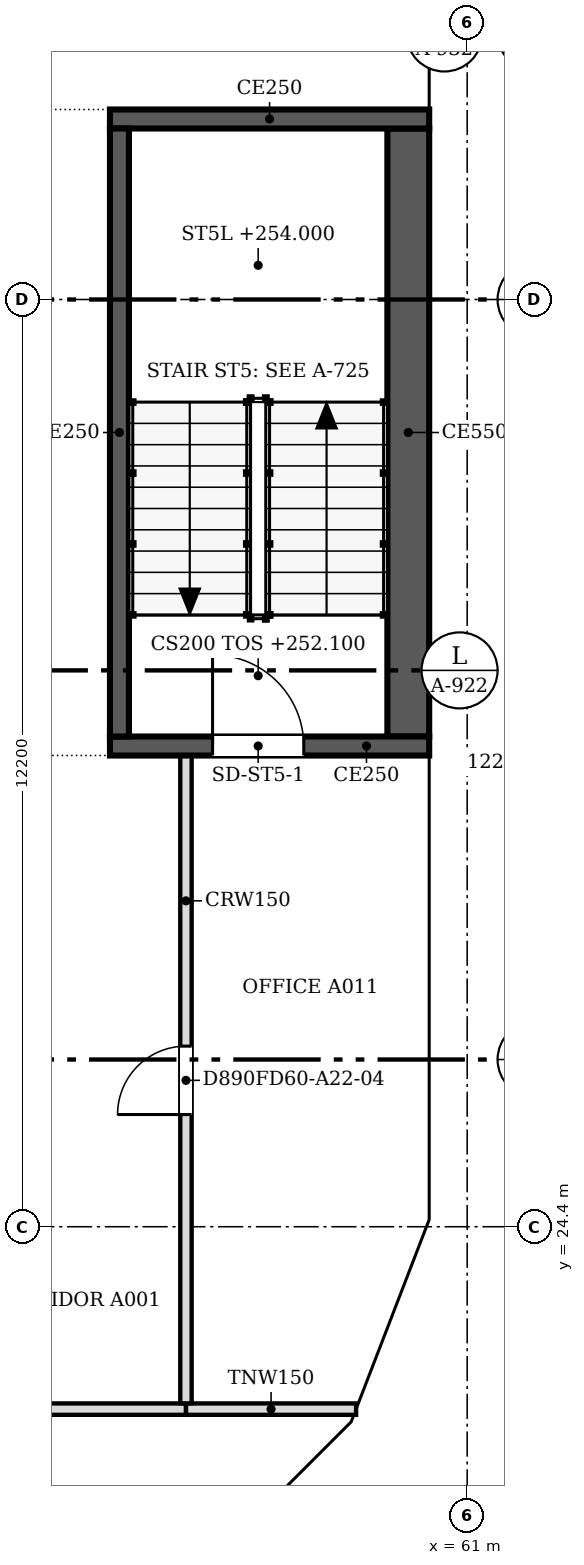
"""IFC4 building model, lengths in metres.
Left out: names, types, materials, properties, quantities, classifications, styles, units other than length and angle.
Written with IfcOpenShell. Run it as: python <this file> out.ifc"""

import sys

from ifc_helpers import new_model, si_unit, direction, frame, frame_2d, origin, place, context, subcontext, project, spatial, polyline, rectangle, outline, extrude, faceted_brep, source, transform, mapped, element, fill, save


model = new_model("IFC4")
c1 = context("Model", 3, precision=1e-05, world=origin(), true_north=direction((0.0, 1.0)))
c2 = subcontext(c1, "Body", "Model", "MODEL_VIEW")
j1 = project(units=[si_unit("LENGTHUNIT", "METRE"), si_unit("PLANEANGLEUNIT", "RADIAN")], contexts=[c1])
p1 = place(None, origin())
s1 = spatial("IfcSite", under=j1, at=p1, CompositionType="ELEMENT")
p2 = place(p1, origin())
s2 = spatial("IfcBuilding", under=s1, at=p2, CompositionType="ELEMENT")
p3 = place(p2, frame((0.0, 0.0, 252.1)))
s3 = spatial("IfcBuildingStorey", under=s2, at=p3, CompositionType="ELEMENT", Elevation=252.1)
m1 = source(origin(), c2, "Body", "Brep", [
    faceted_brep([(2.944, -0.25, 0.0), (2.997, -0.25, 0.068), (2.997, -0.25, 7.532), (2.944, -0.25, 7.6), (0.0, -0.25, 3.8), (0.053, 0.25, 3.868), (2.891, 0.25, 7.532), (2.891, 0.25, 0.068), (0.053, 0.25, 3.732), (2.944, 0.0, 0.0), (2.944, 0.0, 7.6), (0.0, 0.0, 3.8)], [[[0, 1, 2, 3, 4]], [[5, 6, 7, 8]], [[1, 0, 9]], [[10, 3, 2]], [[6, 5, 11, 4, 3, 10]], [[8, 7, 9, 0, 4, 11]], [[8, 11, 5]], [[1, 9, 7, 6, 10, 2]]]),
])
p4 = place(p3, frame((57.606, 19.612, -3.8), z_axis=(0.0, 0.0, 1.0), x_axis=(0.707106781187, 0.707106781187, 0.0)))
e1 = element("IfcWall", 1, at=p4, inside=s3, PredefinedType="SOLIDWALL", context=c2, shape_type="MappedRepresentation", body=[
    mapped(m1, transform((0.0, 0.0, 0.0), scale=1.0)),
])
m2 = source(origin(), c2, "Body", "SweptSolid", [
    extrude(outline(polyline([(2.744, 6.934), (0.316, 3.8), (2.744, 0.666), (2.744, 6.934)])), frame((0.0, 0.26, 0.0), z_axis=(0.0, -1.0, 0.0), x_axis=(1.0, 0.0, 0.0)), (0.0, 0.0, 1.0), 0.52),
])
p5 = place(p4, origin())
e2 = element("IfcOpeningElement", 2, at=p5, cuts=e1, PredefinedType="OPENING", context=c2, shape_type="MappedRepresentation", body=[
    mapped(m2, transform((0.0, 0.0, 0.0), scale=1.0)),
])
m3 = source(origin(), c2, "Body", "Brep", [
    faceted_brep([(0.053, -0.25, 0.0), (3.003, -0.25, 3.8), (0.053, -0.25, 7.6), (0.0, -0.25, 7.531), (0.0, -0.25, 0.068), (0.106, 0.25, 7.532), (2.957, 0.25, 3.86), (2.957, 0.25, 3.74), (0.106, 0.25, 0.068), (3.003, 0.0, 3.8), (0.053, 0.0, 0.0), (0.053, 0.0, 7.6)], [[[0, 1, 2, 3, 4]], [[5, 6, 7, 8]], [[8, 7, 9, 1, 0, 10]], [[6, 5, 11, 2, 1, 9]], [[3, 2, 11]], [[10, 0, 4]], [[8, 10, 4, 3, 11, 5]], [[7, 6, 9]]]),
])
p6 = place(p3, frame((59.669, 21.644, -3.8), z_axis=(0.0, 0.0, 1.0), x_axis=(0.35992665181, 0.932980602862, 0.0)))
e3 = element("IfcWall", 3, at=p6, inside=s3, PredefinedType="SOLIDWALL", context=c2, shape_type="MappedRepresentation", body=[
    mapped(m3, transform((0.0, 0.0, 0.0), scale=1.0)),
])
m4 = source(origin(), c2, "Body", "SweptSolid", [
    extrude(outline(polyline([(0.253, 0.665), (2.687, 3.8), (0.253, 6.935), (0.253, 0.665)])), frame((0.0, 0.26, 0.0), z_axis=(0.0, -1.0, 0.0), x_axis=(1.0, 0.0, 0.0)), (0.0, 0.0, 1.0), 0.52),
])
p7 = place(p6, origin())
e4 = element("IfcOpeningElement", 4, at=p7, cuts=e3, PredefinedType="OPENING", context=c2, shape_type="MappedRepresentation", body=[
    mapped(m4, transform((0.0, 0.0, 0.0), scale=1.0)),
])
m5 = source(origin(), c2, "Body", "Brep", [
    faceted_brep([(3.003, -0.25, 0.0), (6.053, -0.25, 3.8), (3.003, -0.25, 7.6), (0.0, -0.25, 3.8), (0.047, 0.25, 3.859), (3.003, 0.25, 7.6), (6.053, 0.25, 3.8), (3.003, 0.25, 0.0), (0.047, 0.25, 3.741), (0.0, 0.0, 3.8)], [[[0, 1, 2, 3]], [[4, 5, 6, 7, 8]], [[7, 6, 1, 0]], [[6, 5, 2, 1]], [[5, 4, 9, 3, 2]], [[8, 7, 0, 3, 9]], [[8, 9, 4]]]),
])
p8 = place(p3, frame((60.75, 24.447, -3.8), z_axis=(0.0, 0.0, 1.0), x_axis=(0.0, 1.0, 0.0)))
e5 = element("IfcWall", 5, at=p8, inside=s3, PredefinedType="SOLIDWALL", context=c2, shape_type="MappedRepresentation", body=[
    mapped(m5, transform((0.0, 0.0, 0.0), scale=1.0)),
])
m6 = source(origin(), c2, "Body", "SweptSolid", [
    extrude(outline(polyline([(3.005, 0.401), (5.733, 3.8), (3.005, 7.199), (0.319, 3.8), (3.005, 0.401)])), frame((0.0, 0.26, 0.0), z_axis=(0.0, -1.0, 0.0), x_axis=(1.0, 0.0, 0.0)), (0.0, 0.0, 1.0), 0.52),
])
p9 = place(p8, origin())
e6 = element("IfcOpeningElement", 6, at=p9, cuts=e5, PredefinedType="OPENING", context=c2, shape_type="MappedRepresentation", body=[
    mapped(m6, transform((0.0, 0.0, 0.0), scale=1.0)),
])
m7 = source(origin(), c2, "Body", "SweptSolid", [
    extrude(outline(polyline([(3.05, 0.0), (6.1, 3.8), (3.05, 7.6), (0.0, 3.8), (3.05, 0.0)])), frame((0.0, 0.25, 0.0), z_axis=(0.0, -1.0, 0.0), x_axis=(1.0, 0.0, 0.0)), (0.0, 0.0, 1.0), 0.5),
])
p10 = place(p3, frame((60.75, 30.5, -3.8), z_axis=(0.0, 0.0, 1.0), x_axis=(0.0, 1.0, 0.0)))
e7 = element("IfcWall", 7, at=p10, inside=s3, PredefinedType="SOLIDWALL", context=c2, shape_type="MappedRepresentation", body=[
    mapped(m7, transform((0.0, 0.0, 0.0), scale=1.0)),
])
m8 = source(origin(), c2, "Body", "SweptSolid", [
    extrude(outline(polyline([(3.05, 0.399), (5.78, 3.8), (3.05, 7.2), (0.321, 3.8), (3.05, 0.399)])), frame((0.0, 0.26, 0.0), z_axis=(0.0, -1.0, 0.0), x_axis=(1.0, 0.0, 0.0)), (0.0, 0.0, 1.0), 0.52),
])
p11 = place(p10, origin())
e8 = element("IfcOpeningElement", 8, at=p11, cuts=e7, PredefinedType="OPENING", context=c2, shape_type="MappedRepresentation", body=[
    mapped(m8, transform((0.0, 0.0, 0.0), scale=1.0)),
])
m9 = source(origin(), c2, "Body", "Brep", [
    faceted_brep([(3.05, -0.25, 0.0), (6.1, -0.25, 3.8), (6.1, -0.25, 3.8), (3.05, -0.25, 7.6), (0.0, -0.25, 3.8), (0.0, 0.25, 3.8), (3.05, 0.25, 7.6), (6.1, 0.25, 3.8), (6.1, 0.25, 3.8), (3.05, 0.25, 0.0)], [[[0, 1, 2, 3, 4]], [[5, 6, 7, 8, 9]], [[9, 8, 1, 0]], [[7, 6, 3, 2]], [[6, 5, 4, 3]], [[5, 9, 0, 4]], [[1, 8, 7, 2]]]),
])
p12 = place(p3, frame((60.75, 36.6, -3.8), z_axis=(0.0, 0.0, 1.0), x_axis=(0.0, 1.0, 0.0)))
e9 = element("IfcWall", 9, at=p12, inside=s3, PredefinedType="SOLIDWALL", context=c2, shape_type="MappedRepresentation", body=[
    mapped(m9, transform((0.0, 0.0, 0.0), scale=1.0)),
])
p13 = place(p12, origin())
e10 = element("IfcOpeningElement", 10, at=p13, cuts=e9, PredefinedType="OPENING", context=c2, shape_type="MappedRepresentation", body=[
    mapped(m8, transform((0.0, 0.0, 0.0), scale=1.0)),
])
p14 = place(p2, frame((0.0, 0.0, 255.9)))
s4 = spatial("IfcBuildingStorey", under=s2, at=p14, CompositionType="ELEMENT", Elevation=255.9)
m10 = source(origin(), c2, "Body", "Brep", [
    faceted_brep([(0.053, -0.25, 0.0), (2.997, -0.25, 3.8), (0.053, -0.25, 7.6), (0.0, -0.25, 7.532), (0.0, -0.25, 0.068), (0.106, 0.25, 7.531), (2.944, 0.25, 3.868), (2.944, 0.25, 3.732), (0.106, 0.25, 0.068), (2.997, 0.0, 3.8), (0.053, 0.0, 0.0), (0.053, 0.0, 7.6)], [[[0, 1, 2, 3, 4]], [[5, 6, 7, 8]], [[8, 7, 9, 1, 0, 10]], [[6, 5, 11, 2, 1, 9]], [[3, 2, 11]], [[10, 0, 4]], [[8, 10, 4, 3, 11, 5]], [[9, 7, 6]]]),
])
p15 = place(p14, frame((57.569, 19.574, -3.8), z_axis=(0.0, 0.0, 1.0), x_axis=(0.707106781187, 0.707106781187, 0.0)))
e11 = element("IfcWall", 11, at=p15, inside=s4, PredefinedType="SOLIDWALL", context=c2, shape_type="MappedRepresentation", body=[
    mapped(m10, transform((0.0, 0.0, 0.0), scale=1.0)),
])
m11 = source(origin(), c2, "Body", "SweptSolid", [
    extrude(outline(polyline([(0.253, 0.666), (2.681, 3.8), (0.253, 6.934), (0.253, 0.666)])), frame((0.0, 0.26, 0.0), z_axis=(0.0, -1.0, 0.0), x_axis=(1.0, 0.0, 0.0)), (0.0, 0.0, 1.0), 0.52),
])
p16 = place(p15, origin())
e12 = element("IfcOpeningElement", 12, at=p16, cuts=e11, PredefinedType="OPENING", context=c2, shape_type="MappedRepresentation", body=[
    mapped(m11, transform((0.0, 0.0, 0.0), scale=1.0)),
])
m12 = source(origin(), c2, "Body", "Brep", [
    faceted_brep([(2.95, -0.25, 0.0), (2.997, -0.25, 0.059), (2.997, -0.25, 7.541), (2.95, -0.25, 7.6), (0.0, -0.25, 3.8), (0.053, 0.25, 3.868), (2.904, 0.25, 7.54), (2.904, 0.25, 0.06), (0.053, 0.25, 3.732), (2.95, 0.0, 0.0), (2.95, 0.0, 7.6), (0.0, 0.0, 3.8)], [[[0, 1, 2, 3, 4]], [[5, 6, 7, 8]], [[1, 0, 9]], [[10, 3, 2]], [[6, 5, 11, 4, 3, 10]], [[8, 7, 9, 0, 4, 11]], [[8, 11, 5]], [[1, 9, 7, 6, 10, 2]]]),
])
p17 = place(p14, frame((59.688, 21.694, -3.8), z_axis=(0.0, 0.0, 1.0), x_axis=(0.359972353723, 0.932962970624, 0.0)))
e13 = element("IfcWall", 13, at=p17, inside=s4, PredefinedType="SOLIDWALL", context=c2, shape_type="MappedRepresentation", body=[
    mapped(m12, transform((0.0, 0.0, 0.0), scale=1.0)),
])
m13 = source(origin(), c2, "Body", "SweptSolid", [
    extrude(outline(polyline([(2.75, 6.935), (0.316, 3.8), (2.75, 0.665), (2.75, 6.935)])), frame((0.0, 0.26, 0.0), z_axis=(0.0, -1.0, 0.0), x_axis=(1.0, 0.0, 0.0)), (0.0, 0.0, 1.0), 0.52),
])
p18 = place(p17, origin())
e14 = element("IfcOpeningElement", 14, at=p18, cuts=e13, PredefinedType="OPENING", context=c2, shape_type="MappedRepresentation", body=[
    mapped(m13, transform((0.0, 0.0, 0.0), scale=1.0)),
])
m14 = source(origin(), c2, "Body", "Brep", [
    faceted_brep([(0.047, -0.25, 0.0), (3.05, -0.25, 3.8), (0.047, -0.25, 7.6), (0.0, -0.25, 7.54), (0.0, -0.25, 0.06), (0.093, 0.25, 7.541), (3.05, 0.25, 3.8), (0.093, 0.25, 0.059), (0.047, 0.0, 0.0), (0.047, 0.0, 7.6)], [[[0, 1, 2, 3, 4]], [[5, 6, 7]], [[7, 6, 1, 0, 8]], [[6, 5, 9, 2, 1]], [[3, 2, 9]], [[8, 0, 4]], [[7, 8, 4, 3, 9, 5]]]),
])
p19 = place(p14, frame((60.75, 24.4, -3.8), z_axis=(0.0, 0.0, 1.0), x_axis=(0.0, 1.0, 0.0)))
e15 = element("IfcWall", 15, at=p19, inside=s4, PredefinedType="SOLIDWALL", context=c2, shape_type="MappedRepresentation", body=[
    mapped(m14, transform((0.0, 0.0, 0.0), scale=1.0)),
])
m15 = source(origin(), c2, "Body", "SweptSolid", [
    extrude(outline(polyline([(0.247, 0.656), (2.731, 3.8), (0.247, 6.944), (0.247, 0.656)])), frame((0.0, 0.26, 0.0), z_axis=(0.0, -1.0, 0.0), x_axis=(1.0, 0.0, 0.0)), (0.0, 0.0, 1.0), 0.52),
])
p20 = place(p19, origin())
e16 = element("IfcOpeningElement", 16, at=p20, cuts=e15, PredefinedType="OPENING", context=c2, shape_type="MappedRepresentation", body=[
    mapped(m15, transform((0.0, 0.0, 0.0), scale=1.0)),
])
m16 = source(origin(), c2, "Body", "SweptSolid", [
    extrude(outline(polyline([(3.05, 0.0), (6.1, 3.8), (3.05, 7.6), (0.0, 3.8), (3.05, 0.0)])), frame((0.0, 0.25, 0.0), z_axis=(0.0, -1.0, 0.0), x_axis=(1.0, 0.0, 0.0)), (0.0, 0.0, 1.0), 0.5),
])
p21 = place(p14, frame((60.75, 27.45, -3.8), z_axis=(0.0, 0.0, 1.0), x_axis=(0.0, 1.0, 0.0)))
e17 = element("IfcWall", 17, at=p21, inside=s4, PredefinedType="SOLIDWALL", context=c2, shape_type="MappedRepresentation", body=[
    mapped(m16, transform((0.0, 0.0, 0.0), scale=1.0)),
])
m17 = source(origin(), c2, "Body", "SweptSolid", [
    extrude(outline(polyline([(3.05, 0.399), (5.78, 3.8), (3.05, 7.2), (0.321, 3.8), (3.05, 0.399)])), frame((0.0, 0.26, 0.0), z_axis=(0.0, -1.0, 0.0), x_axis=(1.0, 0.0, 0.0)), (0.0, 0.0, 1.0), 0.52),
])
p22 = place(p21, origin())
e18 = element("IfcOpeningElement", 18, at=p22, cuts=e17, PredefinedType="OPENING", context=c2, shape_type="MappedRepresentation", body=[
    mapped(m17, transform((0.0, 0.0, 0.0), scale=1.0)),
])
m18 = source(origin(), c2, "Body", "Brep", [
    faceted_brep([(3.05, -0.25, 0.0), (6.1, -0.25, 3.8), (6.1, -0.25, 3.8), (3.05, -0.25, 7.6), (0.0, -0.25, 3.8), (0.0, 0.25, 3.8), (3.05, 0.25, 7.6), (6.1, 0.25, 3.8), (6.1, 0.25, 3.8), (3.05, 0.25, 0.0)], [[[0, 1, 2, 3, 4]], [[5, 6, 7, 8, 9]], [[9, 8, 1, 0]], [[7, 6, 3, 2]], [[6, 5, 4, 3]], [[5, 9, 0, 4]], [[1, 8, 7, 2]]]),
])
p23 = place(p14, frame((60.75, 33.55, -3.8), z_axis=(0.0, 0.0, 1.0), x_axis=(0.0, 1.0, 0.0)))
e19 = element("IfcWall", 19, at=p23, inside=s4, PredefinedType="SOLIDWALL", context=c2, shape_type="MappedRepresentation", body=[
    mapped(m18, transform((0.0, 0.0, 0.0), scale=1.0)),
])
p24 = place(p23, origin())
e20 = element("IfcOpeningElement", 20, at=p24, cuts=e19, PredefinedType="OPENING", context=c2, shape_type="MappedRepresentation", body=[
    mapped(m17, transform((0.0, 0.0, 0.0), scale=1.0)),
])
p25 = place(p14, frame((60.75, 39.65, -3.8), z_axis=(0.0, 0.0, 1.0), x_axis=(0.0, 1.0, 0.0)))
e21 = element("IfcWall", 21, at=p25, inside=s4, PredefinedType="SOLIDWALL", context=c2, shape_type="MappedRepresentation", body=[
    mapped(m16, transform((0.0, 0.0, 0.0), scale=1.0)),
])
p26 = place(p25, origin())
e22 = element("IfcOpeningElement", 22, at=p26, cuts=e21, PredefinedType="OPENING", context=c2, shape_type="MappedRepresentation", body=[
    mapped(m17, transform((0.0, 0.0, 0.0), scale=1.0)),
])
p27 = place(p3, frame((60.5, 30.725, 0.0), z_axis=(0.0, 0.0, 1.0), x_axis=(-1.0, 0.0, 0.0)))
e23 = element("IfcWall", 23, at=p27, inside=s3, PredefinedType="SOLIDWALL", context=c2, shape_type="SweptSolid", body=[
    extrude(rectangle(XDim=4.2, YDim=0.25, at=frame_2d((2.1, 0.0))), origin(), (0.0, 0.0, 1.0), 3.8),
])
m19 = source(origin(), c2, "Body", "SweptSolid", [
    extrude(rectangle(XDim=1.2, YDim=2.1, at=frame_2d((0.6, 1.05))), frame((0.0, 0.135, 0.0), z_axis=(0.0, -1.0, 0.0), x_axis=(1.0, 0.0, 0.0)), (0.0, 0.0, 1.0), 0.27),
])
p28 = place(p27, frame((1.65, 0.0, 0.0)))
e24 = element("IfcOpeningElement", 24, at=p28, cuts=e23, PredefinedType="OPENING", context=c2, shape_type="MappedRepresentation", body=[
    mapped(m19, transform((0.0, 0.0, 0.0), scale=1.0)),
])
p29 = place(p3, frame((56.425, 30.85, 0.0), z_axis=(0.0, 0.0, 1.0), x_axis=(0.0, 1.0, 0.0)))
e25 = element("IfcWall", 25, at=p29, inside=s3, PredefinedType="SOLIDWALL", context=c2, shape_type="SweptSolid", body=[
    extrude(rectangle(XDim=8.0, YDim=0.25, at=frame_2d((4.0, 0.0))), origin(), (0.0, 0.0, 1.0), 3.8),
])
p30 = place(p3, frame((56.3, 38.975, 0.0), z_axis=(0.0, 0.0, 1.0), x_axis=(1.0, 0.0, 0.0)))
e26 = element("IfcWall", 26, at=p30, inside=s3, PredefinedType="SOLIDWALL", context=c2, shape_type="SweptSolid", body=[
    extrude(rectangle(XDim=4.2, YDim=0.25, at=frame_2d((2.1, 0.0))), origin(), (0.0, 0.0, 1.0), 3.8),
])
p31 = place(p3, frame((60.225, 38.85, 0.0), z_axis=(0.0, 0.0, 1.0), x_axis=(0.0, -1.0, 0.0)))
e27 = element("IfcWall", 27, at=p31, inside=s3, PredefinedType="SOLIDWALL", context=c2, shape_type="SweptSolid", body=[
    extrude(rectangle(XDim=8.0, YDim=0.55, at=frame_2d((4.0, 0.0))), origin(), (0.0, 0.0, 1.0), 3.8),
])
p32 = place(p3, frame((57.3, 22.0, 0.0), z_axis=(0.0, 0.0, 1.0), x_axis=(-1.0, 0.0, 0.0)))
e28 = element("IfcWall", 28, at=p32, inside=s3, PredefinedType="PARTITIONING", context=c2, shape_type="SweptSolid", body=[
    extrude(rectangle(XDim=29.2, YDim=0.15, at=frame_2d((14.6, 0.0))), origin(), (0.0, 0.0, 1.0), 3.067),
])
m20 = source(origin(), c2, "Body", "SweptSolid", [
    extrude(rectangle(XDim=0.9, YDim=2.1, at=frame_2d((0.45, 1.05))), frame((0.0, 0.085, 0.0), z_axis=(0.0, -1.0, 0.0), x_axis=(1.0, 0.0, 0.0)), (0.0, 0.0, 1.0), 0.17),
])
p33 = place(p32, frame((22.7, 0.0, 0.0)))
e29 = element("IfcOpeningElement", 29, at=p33, cuts=e28, PredefinedType="OPENING", context=c2, shape_type="MappedRepresentation", body=[
    mapped(m20, transform((0.0, 0.0, 0.0), scale=1.0)),
])
p34 = place(p32, frame((8.1, 0.0, 0.0)))
e30 = element("IfcOpeningElement", 30, at=p34, cuts=e28, PredefinedType="OPENING", context=c2, shape_type="MappedRepresentation", body=[
    mapped(m20, transform((0.0, 0.0, 0.0), scale=1.0)),
])
p35 = place(p3, frame((57.301, 22.0, 0.0), z_axis=(0.0, 0.0, 1.0), x_axis=(1.0, 0.0, 0.0)))
e31 = element("IfcWall", 31, at=p35, inside=s3, PredefinedType="PARTITIONING", context=c2, shape_type="SweptSolid", body=[
    extrude(rectangle(XDim=2.237, YDim=0.15, at=frame_2d((1.119, 0.0))), origin(), (0.0, 0.0, 1.0), 3.067),
])
p36 = place(p3, frame((57.3, 30.6, 0.0), z_axis=(0.0, 0.0, 1.0), x_axis=(0.0, -1.0, 0.0)))
e32 = element("IfcWall", 32, at=p36, inside=s3, PredefinedType="PARTITIONING", context=c2, shape_type="SweptSolid", body=[
    extrude(rectangle(XDim=8.524, YDim=0.15, at=frame_2d((4.262, 0.0))), origin(), (0.0, 0.0, 1.0), 3.067),
])
p37 = place(p36, frame((3.824, 0.0, 0.0)))
e33 = element("IfcOpeningElement", 33, at=p37, cuts=e32, PredefinedType="OPENING", context=c2, shape_type="MappedRepresentation", body=[
    mapped(m20, transform((0.0, 0.0, 0.0), scale=1.0)),
])
m21 = source(origin(), c2, "Body", "SweptSolid", [
    extrude(rectangle(XDim=1.2, YDim=2.1, at=frame_2d((0.6, 1.05))), frame((0.0, 0.025, 0.0), z_axis=(0.0, -1.0, 0.0), x_axis=(1.0, 0.0, 0.0)), (0.0, 0.0, 1.0), 0.05),
])
p38 = place(p28, origin())
e34 = element("IfcDoor", 34, at=p38, inside=s3, OperationType="SINGLE_SWING_RIGHT", PredefinedType="DOOR", context=c2, shape_type="MappedRepresentation", body=[
    mapped(m21, transform((0.0, 0.0, 0.0), scale=1.0)),
])
fill(e24, e34)
m22 = source(origin(), c2, "Body", "SweptSolid", [
    extrude(rectangle(XDim=0.9, YDim=2.1, at=frame_2d((0.45, 1.05))), frame((0.0, 0.025, 0.0), z_axis=(0.0, -1.0, 0.0), x_axis=(1.0, 0.0, 0.0)), (0.0, 0.0, 1.0), 0.05),
])
p39 = place(p37, origin())
e35 = element("IfcDoor", 35, at=p39, inside=s3, OperationType="SINGLE_SWING_RIGHT", PredefinedType="DOOR", context=c2, shape_type="MappedRepresentation", body=[
    mapped(m22, transform((0.0, 0.0, 0.0), scale=1.0)),
])
fill(e33, e35)
save(model, sys.argv[1])
